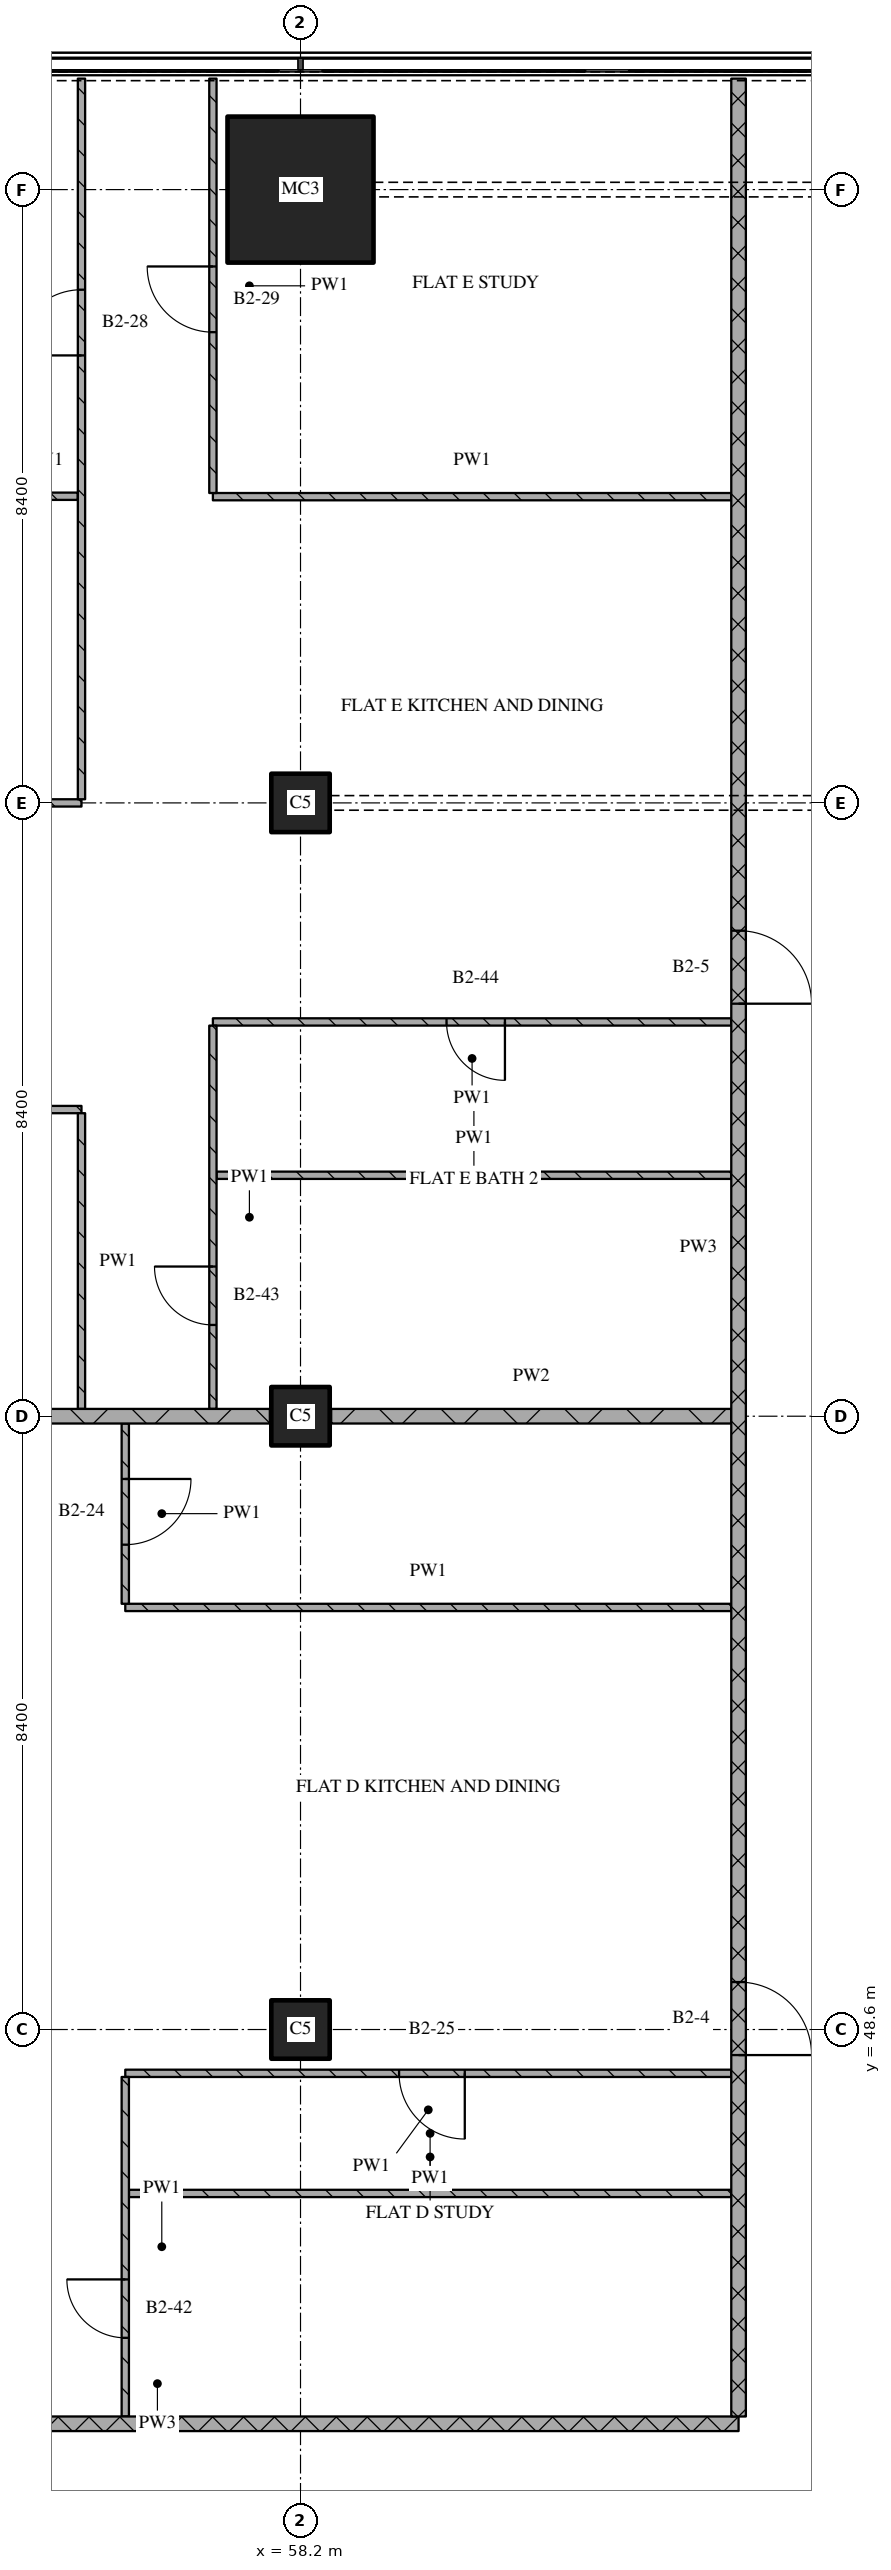
"""IFC4 building model, lengths in metres.
Left out: names, types, materials, properties, quantities, classifications, styles, units other than length and angle.
Written with IfcOpenShell. Run it as: python <this file> out.ifc"""

import sys

from ifc_helpers import new_model, si_unit, direction, frame, frame_2d, origin, origin_2d, place, context, subcontext, project, spatial, rectangle, extrude, element, fill, save


model = new_model("IFC4")
c1 = context("Model", 3, precision=1e-05, world=origin(), true_north=direction((0.0, 1.0)))
c2 = subcontext(c1, "Body", "Model", "MODEL_VIEW")
j1 = project(units=[si_unit("LENGTHUNIT", "METRE"), si_unit("PLANEANGLEUNIT", "RADIAN")], contexts=[c1])
p1 = place(None, origin())
s1 = spatial("IfcSite", under=j1, at=p1, CompositionType="ELEMENT")
p2 = place(p1, origin())
s2 = spatial("IfcBuilding", under=s1, at=p2, CompositionType="ELEMENT")
p3 = place(p2, frame((0.0, 0.0, 113.25)))
s3 = spatial("IfcBuildingStorey", under=s2, at=p3, CompositionType="ELEMENT", Elevation=113.25)
for number, where, z_axis, x_axis in (
    (1, (58.2, 48.6, 0.0), (0.0, 0.0, 1.0), (1.0, 0.0, 0.0)),
    (2, (58.2, 57.0, 0.0), (0.0, 0.0, 1.0), (1.0, 0.0, 0.0)),
    (3, (58.2, 65.4, 0.0), (0.0, 0.0, 1.0), (1.0, 0.0, 0.0)),
):
    element("IfcColumn", number, at=place(p3, frame(where, z_axis=z_axis, x_axis=x_axis)), inside=s3, PredefinedType="COLUMN", context=c2, shape_type="SweptSolid", body=[
        extrude(rectangle(XDim=0.8, YDim=0.8, at=origin_2d()), origin(), (0.0, 0.0, 1.0), 3.6),
    ])
p4 = place(p3, frame((58.2, 73.8, 0.0), z_axis=(0.0, 0.0, 1.0), x_axis=(1.0, 0.0, 0.0)))
e4 = element("IfcColumn", 4, at=p4, inside=s3, PredefinedType="COLUMN", context=c2, shape_type="SweptSolid", body=[
    extrude(rectangle(XDim=2.0, YDim=2.0, at=origin_2d()), origin(), (0.0, 0.0, 1.0), 3.6),
])
p5 = place(p3, frame((48.28, 43.2, 0.0), z_axis=(0.0, 0.0, 1.0), x_axis=(1.0, 0.0, 0.0)))
e5 = element("IfcWall", 5, at=p5, inside=s3, PredefinedType="PARTITIONING", context=c2, shape_type="SweptSolid", body=[
    extrude(rectangle(XDim=15.92, YDim=0.2, at=frame_2d((7.96, 0.0))), origin(), (0.0, 0.0, 1.0), 3.32),
])
p6 = place(p3, frame((55.85, 46.355, 0.0), z_axis=(0.0, 0.0, 1.0), x_axis=(1.0, 0.0, 0.0)))
e6 = element("IfcWall", 6, at=p6, inside=s3, PredefinedType="PARTITIONING", context=c2, shape_type="SweptSolid", body=[
    extrude(rectangle(XDim=8.25, YDim=0.1, at=frame_2d((4.125, 0.0))), origin(), (0.0, 0.0, 1.0), 3.32),
])
p7 = place(p3, frame((64.1, 48.0, 0.0), z_axis=(0.0, 0.0, 1.0), x_axis=(-1.0, 0.0, 0.0)))
e7 = element("IfcWall", 7, at=p7, inside=s3, PredefinedType="PARTITIONING", context=c2, shape_type="SweptSolid", body=[
    extrude(rectangle(XDim=8.3, YDim=0.1, at=frame_2d((4.15, 0.0))), origin(), (0.0, 0.0, 1.0), 3.32),
])
p8 = place(p7, frame((3.65, 0.0, 0.0)))
e8 = element("IfcOpeningElement", 8, at=p8, cuts=e7, PredefinedType="OPENING", context=c2, shape_type="SweptSolid", body=[
    extrude(rectangle(XDim=0.9, YDim=2.1, at=frame_2d((0.45, 1.05))), frame((0.0, 0.06, 0.0), z_axis=(0.0, -1.0, 0.0), x_axis=(1.0, 0.0, 0.0)), (0.0, 0.0, 1.0), 0.12),
])
p9 = place(p3, frame((55.8, 54.381, 0.0), z_axis=(0.0, 0.0, 1.0), x_axis=(1.0, 0.0, 0.0)))
e9 = element("IfcWall", 9, at=p9, inside=s3, PredefinedType="PARTITIONING", context=c2, shape_type="SweptSolid", body=[
    extrude(rectangle(XDim=8.3, YDim=0.1, at=frame_2d((4.15, 0.0))), origin(), (0.0, 0.0, 1.0), 3.32),
])
p10 = place(p3, frame((50.22, 57.0, 0.0), z_axis=(0.0, 0.0, 1.0), x_axis=(1.0, 0.0, 0.0)))
e10 = element("IfcWall", 10, at=p10, inside=s3, PredefinedType="PARTITIONING", context=c2, shape_type="SweptSolid", body=[
    extrude(rectangle(XDim=7.56, YDim=0.2, at=frame_2d((3.78, 0.0))), origin(), (0.0, 0.0, 1.0), 3.32),
])
p11 = place(p3, frame((58.62, 57.0, 0.0), z_axis=(0.0, 0.0, 1.0), x_axis=(1.0, 0.0, 0.0)))
e11 = element("IfcWall", 11, at=p11, inside=s3, PredefinedType="PARTITIONING", context=c2, shape_type="SweptSolid", body=[
    extrude(rectangle(XDim=5.48, YDim=0.2, at=frame_2d((2.74, 0.0))), origin(), (0.0, 0.0, 1.0), 3.32),
])
p12 = place(p3, frame((57.05, 60.3, 0.0), z_axis=(0.0, 0.0, 1.0), x_axis=(1.0, 0.0, 0.0)))
e12 = element("IfcWall", 12, at=p12, inside=s3, PredefinedType="PARTITIONING", context=c2, shape_type="SweptSolid", body=[
    extrude(rectangle(XDim=7.05, YDim=0.1, at=frame_2d((3.525, 0.0))), origin(), (0.0, 0.0, 1.0), 3.32),
])
p13 = place(p3, frame((55.2, 61.2, 0.0), z_axis=(0.0, 0.0, 1.0), x_axis=(-1.0, 0.0, 0.0)))
e13 = element("IfcWall", 13, at=p13, inside=s3, PredefinedType="PARTITIONING", context=c2, shape_type="SweptSolid", body=[
    extrude(rectangle(XDim=6.92, YDim=0.1, at=frame_2d((3.46, 0.0))), origin(), (0.0, 0.0, 1.0), 3.32),
])
p14 = place(p13, frame((3.15, 0.0, 0.0)))
e14 = element("IfcOpeningElement", 14, at=p14, cuts=e13, PredefinedType="OPENING", context=c2, shape_type="SweptSolid", body=[
    extrude(rectangle(XDim=0.9, YDim=2.1, at=frame_2d((0.45, 1.05))), frame((0.0, 0.06, 0.0), z_axis=(0.0, -1.0, 0.0), x_axis=(1.0, 0.0, 0.0)), (0.0, 0.0, 1.0), 0.12),
])
p15 = place(p3, frame((64.1, 62.4, 0.0), z_axis=(0.0, 0.0, 1.0), x_axis=(-1.0, 0.0, 0.0)))
e15 = element("IfcWall", 15, at=p15, inside=s3, PredefinedType="PARTITIONING", context=c2, shape_type="SweptSolid", body=[
    extrude(rectangle(XDim=7.1, YDim=0.1, at=frame_2d((3.55, 0.0))), origin(), (0.0, 0.0, 1.0), 3.32),
])
p16 = place(p15, frame((3.1, 0.0, 0.0)))
e16 = element("IfcOpeningElement", 16, at=p16, cuts=e15, PredefinedType="OPENING", context=c2, shape_type="SweptSolid", body=[
    extrude(rectangle(XDim=0.8, YDim=2.1, at=frame_2d((0.4, 1.05))), frame((0.0, 0.06, 0.0), z_axis=(0.0, -1.0, 0.0), x_axis=(1.0, 0.0, 0.0)), (0.0, 0.0, 1.0), 0.12),
])
p17 = place(p3, frame((50.82, 65.4, 0.0), z_axis=(0.0, 0.0, 1.0), x_axis=(1.0, 0.0, 0.0)))
e17 = element("IfcWall", 17, at=p17, inside=s3, PredefinedType="PARTITIONING", context=c2, shape_type="SweptSolid", body=[
    extrude(rectangle(XDim=4.38, YDim=0.1, at=frame_2d((2.19, 0.0))), origin(), (0.0, 0.0, 1.0), 3.32),
])
p18 = place(p17, frame((0.33, 0.0, 0.0)))
e18 = element("IfcOpeningElement", 18, at=p18, cuts=e17, PredefinedType="OPENING", context=c2, shape_type="SweptSolid", body=[
    extrude(rectangle(XDim=0.9, YDim=2.1, at=frame_2d((0.45, 1.05))), frame((0.0, 0.06, 0.0), z_axis=(0.0, -1.0, 0.0), x_axis=(1.0, 0.0, 0.0)), (0.0, 0.0, 1.0), 0.12),
])
p19 = place(p3, frame((57.0, 69.594, 0.0), z_axis=(0.0, 0.0, 1.0), x_axis=(1.0, 0.0, 0.0)))
e19 = element("IfcWall", 19, at=p19, inside=s3, PredefinedType="PARTITIONING", context=c2, shape_type="SweptSolid", body=[
    extrude(rectangle(XDim=7.1, YDim=0.1, at=frame_2d((3.55, 0.0))), origin(), (0.0, 0.0, 1.0), 3.32),
])
p20 = place(p3, frame((48.28, 69.6, 0.0), z_axis=(0.0, 0.0, 1.0), x_axis=(1.0, 0.0, 0.0)))
e20 = element("IfcWall", 20, at=p20, inside=s3, PredefinedType="PARTITIONING", context=c2, shape_type="SweptSolid", body=[
    extrude(rectangle(XDim=6.87, YDim=0.1, at=frame_2d((3.435, 0.0))), origin(), (0.0, 0.0, 1.0), 3.32),
])
p21 = place(p3, frame((55.2, 61.15, 0.0), z_axis=(0.0, 0.0, 1.0), x_axis=(0.0, -1.0, 0.0)))
e21 = element("IfcWall", 21, at=p21, inside=s3, PredefinedType="PARTITIONING", context=c2, shape_type="SweptSolid", body=[
    extrude(rectangle(XDim=4.05, YDim=0.1, at=frame_2d((2.025, 0.0))), origin(), (0.0, 0.0, 1.0), 3.32),
])
p22 = place(p3, frame((55.2, 65.45, 0.0), z_axis=(0.0, 0.0, 1.0), x_axis=(0.0, 1.0, 0.0)))
e22 = element("IfcWall", 22, at=p22, inside=s3, PredefinedType="PARTITIONING", context=c2, shape_type="SweptSolid", body=[
    extrude(rectangle(XDim=9.87, YDim=0.1, at=frame_2d((4.935, 0.0))), origin(), (0.0, 0.0, 1.0), 3.32),
])
p23 = place(p22, frame((6.079, 0.0, 0.0)))
e23 = element("IfcOpeningElement", 23, at=p23, cuts=e22, PredefinedType="OPENING", context=c2, shape_type="SweptSolid", body=[
    extrude(rectangle(XDim=0.9, YDim=2.1, at=frame_2d((0.45, 1.05))), frame((0.0, 0.06, 0.0), z_axis=(0.0, -1.0, 0.0), x_axis=(1.0, 0.0, 0.0)), (0.0, 0.0, 1.0), 0.12),
])
p24 = place(p3, frame((55.8, 47.95, 0.0), z_axis=(0.0, 0.0, 1.0), x_axis=(0.0, -1.0, 0.0)))
e24 = element("IfcWall", 24, at=p24, inside=s3, PredefinedType="PARTITIONING", context=c2, shape_type="SweptSolid", body=[
    extrude(rectangle(XDim=4.65, YDim=0.1, at=frame_2d((2.325, 0.0))), origin(), (0.0, 0.0, 1.0), 3.32),
])
p25 = place(p24, frame((2.773, 0.0, 0.0)))
e25 = element("IfcOpeningElement", 25, at=p25, cuts=e24, PredefinedType="OPENING", context=c2, shape_type="SweptSolid", body=[
    extrude(rectangle(XDim=0.8, YDim=2.1, at=frame_2d((0.4, 1.05))), frame((0.0, 0.06, 0.0), z_axis=(0.0, -1.0, 0.0), x_axis=(1.0, 0.0, 0.0)), (0.0, 0.0, 1.0), 0.12),
])
p26 = place(p3, frame((55.8, 56.9, 0.0), z_axis=(0.0, 0.0, 1.0), x_axis=(0.0, -1.0, 0.0)))
e26 = element("IfcWall", 26, at=p26, inside=s3, PredefinedType="PARTITIONING", context=c2, shape_type="SweptSolid", body=[
    extrude(rectangle(XDim=2.469, YDim=0.1, at=frame_2d((1.234, 0.0))), origin(), (0.0, 0.0, 1.0), 3.32),
])
p27 = place(p26, frame((0.76, 0.0, 0.0)))
e27 = element("IfcOpeningElement", 27, at=p27, cuts=e26, PredefinedType="OPENING", context=c2, shape_type="SweptSolid", body=[
    extrude(rectangle(XDim=0.9, YDim=2.1, at=frame_2d((0.45, 1.05))), frame((0.0, 0.06, 0.0), z_axis=(0.0, -1.0, 0.0), x_axis=(1.0, 0.0, 0.0)), (0.0, 0.0, 1.0), 0.12),
])
p28 = place(p3, frame((57.0, 62.35, 0.0), z_axis=(0.0, 0.0, 1.0), x_axis=(0.0, -1.0, 0.0)))
e28 = element("IfcWall", 28, at=p28, inside=s3, PredefinedType="PARTITIONING", context=c2, shape_type="SweptSolid", body=[
    extrude(rectangle(XDim=5.25, YDim=0.1, at=frame_2d((2.625, 0.0))), origin(), (0.0, 0.0, 1.0), 3.32),
])
p29 = place(p28, frame((3.3, 0.0, 0.0)))
e29 = element("IfcOpeningElement", 29, at=p29, cuts=e28, PredefinedType="OPENING", context=c2, shape_type="SweptSolid", body=[
    extrude(rectangle(XDim=0.8, YDim=2.1, at=frame_2d((0.4, 1.05))), frame((0.0, 0.06, 0.0), z_axis=(0.0, -1.0, 0.0), x_axis=(1.0, 0.0, 0.0)), (0.0, 0.0, 1.0), 0.12),
])
p30 = place(p3, frame((57.0, 75.32, 0.0), z_axis=(0.0, 0.0, 1.0), x_axis=(0.0, -1.0, 0.0)))
e30 = element("IfcWall", 30, at=p30, inside=s3, PredefinedType="PARTITIONING", context=c2, shape_type="SweptSolid", body=[
    extrude(rectangle(XDim=5.676, YDim=0.1, at=frame_2d((2.838, 0.0))), origin(), (0.0, 0.0, 1.0), 3.32),
])
p31 = place(p30, frame((2.573, 0.0, 0.0)))
e31 = element("IfcOpeningElement", 31, at=p31, cuts=e30, PredefinedType="OPENING", context=c2, shape_type="SweptSolid", body=[
    extrude(rectangle(XDim=0.9, YDim=2.1, at=frame_2d((0.45, 1.05))), frame((0.0, 0.06, 0.0), z_axis=(0.0, -1.0, 0.0), x_axis=(1.0, 0.0, 0.0)), (0.0, 0.0, 1.0), 0.12),
])
p32 = place(p3, frame((64.2, 43.3, 0.0), z_axis=(0.0, 0.0, 1.0), x_axis=(0.0, 1.0, 0.0)))
e32 = element("IfcWall", 32, at=p32, inside=s3, PredefinedType="PARTITIONING", context=c2, shape_type="SweptSolid", body=[
    extrude(rectangle(XDim=32.02, YDim=0.2, at=frame_2d((16.01, 0.0))), origin(), (0.0, 0.0, 1.0), 3.32),
])
p33 = place(p32, frame((4.95, 0.0, 0.0)))
e33 = element("IfcOpeningElement", 33, at=p33, cuts=e32, PredefinedType="OPENING", context=c2, shape_type="SweptSolid", body=[
    extrude(rectangle(XDim=1.0, YDim=2.1, at=frame_2d((0.5, 1.05))), frame((0.0, 0.11, 0.0), z_axis=(0.0, -1.0, 0.0), x_axis=(1.0, 0.0, 0.0)), (0.0, 0.0, 1.0), 0.22),
])
p34 = place(p32, frame((19.35, 0.0, 0.0)))
e34 = element("IfcOpeningElement", 34, at=p34, cuts=e32, PredefinedType="OPENING", context=c2, shape_type="SweptSolid", body=[
    extrude(rectangle(XDim=1.0, YDim=2.1, at=frame_2d((0.5, 1.05))), frame((0.0, 0.11, 0.0), z_axis=(0.0, -1.0, 0.0), x_axis=(1.0, 0.0, 0.0)), (0.0, 0.0, 1.0), 0.22),
])
p35 = place(p8, origin())
e35 = element("IfcDoor", 35, at=p35, inside=s3, OperationType="SINGLE_SWING_LEFT", PredefinedType="DOOR", context=c2, shape_type="SweptSolid", body=[
    extrude(rectangle(XDim=0.9, YDim=2.1, at=frame_2d((0.45, 1.05))), frame((0.0, 0.025, 0.0), z_axis=(0.0, -1.0, 0.0), x_axis=(1.0, 0.0, 0.0)), (0.0, 0.0, 1.0), 0.05),
])
fill(e8, e35)
p36 = place(p16, origin())
e36 = element("IfcDoor", 36, at=p36, inside=s3, OperationType="SINGLE_SWING_LEFT", PredefinedType="DOOR", context=c2, shape_type="SweptSolid", body=[
    extrude(rectangle(XDim=0.8, YDim=2.1, at=frame_2d((0.4, 1.05))), frame((0.0, 0.025, 0.0), z_axis=(0.0, -1.0, 0.0), x_axis=(1.0, 0.0, 0.0)), (0.0, 0.0, 1.0), 0.05),
])
fill(e16, e36)
p37 = place(p23, origin())
e37 = element("IfcDoor", 37, at=p37, inside=s3, OperationType="SINGLE_SWING_LEFT", PredefinedType="DOOR", context=c2, shape_type="SweptSolid", body=[
    extrude(rectangle(XDim=0.9, YDim=2.1, at=frame_2d((0.45, 1.05))), frame((0.0, 0.025, 0.0), z_axis=(0.0, -1.0, 0.0), x_axis=(1.0, 0.0, 0.0)), (0.0, 0.0, 1.0), 0.05),
])
fill(e23, e37)
p38 = place(p25, origin())
e38 = element("IfcDoor", 38, at=p38, inside=s3, OperationType="SINGLE_SWING_RIGHT", PredefinedType="DOOR", context=c2, shape_type="SweptSolid", body=[
    extrude(rectangle(XDim=0.8, YDim=2.1, at=frame_2d((0.4, 1.05))), frame((0.0, 0.025, 0.0), z_axis=(0.0, -1.0, 0.0), x_axis=(1.0, 0.0, 0.0)), (0.0, 0.0, 1.0), 0.05),
])
fill(e25, e38)
p39 = place(p27, origin())
e39 = element("IfcDoor", 39, at=p39, inside=s3, OperationType="SINGLE_SWING_LEFT", PredefinedType="DOOR", context=c2, shape_type="SweptSolid", body=[
    extrude(rectangle(XDim=0.9, YDim=2.1, at=frame_2d((0.45, 1.05))), frame((0.0, 0.025, 0.0), z_axis=(0.0, -1.0, 0.0), x_axis=(1.0, 0.0, 0.0)), (0.0, 0.0, 1.0), 0.05),
])
fill(e27, e39)
p40 = place(p29, origin())
e40 = element("IfcDoor", 40, at=p40, inside=s3, OperationType="SINGLE_SWING_RIGHT", PredefinedType="DOOR", context=c2, shape_type="SweptSolid", body=[
    extrude(rectangle(XDim=0.8, YDim=2.1, at=frame_2d((0.4, 1.05))), frame((0.0, 0.025, 0.0), z_axis=(0.0, -1.0, 0.0), x_axis=(1.0, 0.0, 0.0)), (0.0, 0.0, 1.0), 0.05),
])
fill(e29, e40)
p41 = place(p31, origin())
e41 = element("IfcDoor", 41, at=p41, inside=s3, OperationType="SINGLE_SWING_RIGHT", PredefinedType="DOOR", context=c2, shape_type="SweptSolid", body=[
    extrude(rectangle(XDim=0.9, YDim=2.1, at=frame_2d((0.45, 1.05))), frame((0.0, 0.025, 0.0), z_axis=(0.0, -1.0, 0.0), x_axis=(1.0, 0.0, 0.0)), (0.0, 0.0, 1.0), 0.05),
])
fill(e31, e41)
p42 = place(p33, origin())
e42 = element("IfcDoor", 42, at=p42, inside=s3, OperationType="SINGLE_SWING_RIGHT", PredefinedType="DOOR", context=c2, shape_type="SweptSolid", body=[
    extrude(rectangle(XDim=1.0, YDim=2.1, at=frame_2d((0.5, 1.05))), frame((0.0, 0.025, 0.0), z_axis=(0.0, -1.0, 0.0), x_axis=(1.0, 0.0, 0.0)), (0.0, 0.0, 1.0), 0.05),
])
fill(e33, e42)
p43 = place(p34, origin())
e43 = element("IfcDoor", 43, at=p43, inside=s3, OperationType="SINGLE_SWING_RIGHT", PredefinedType="DOOR", context=c2, shape_type="SweptSolid", body=[
    extrude(rectangle(XDim=1.0, YDim=2.1, at=frame_2d((0.5, 1.05))), frame((0.0, 0.025, 0.0), z_axis=(0.0, -1.0, 0.0), x_axis=(1.0, 0.0, 0.0)), (0.0, 0.0, 1.0), 0.05),
])
fill(e34, e43)
save(model, sys.argv[1])
